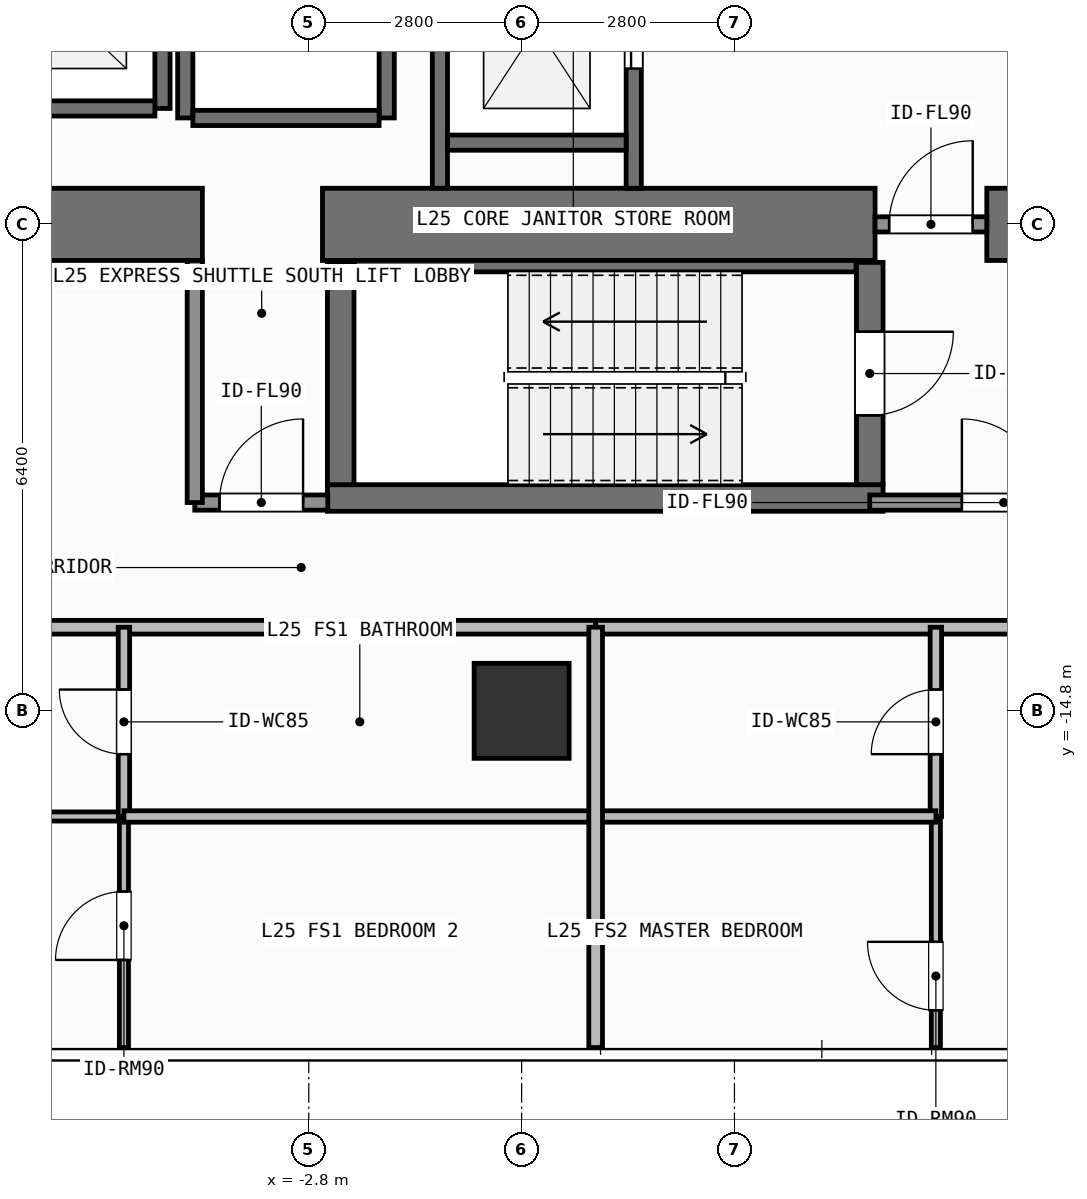
"""IFC4 building model, lengths in metres.
Left out: names, types, materials, properties, quantities, classifications, styles, units other than length and angle.
Written with IfcOpenShell. Run it as: python <this file> out.ifc"""

import sys

from ifc_helpers import new_model, si_unit, direction, frame, frame_2d, origin, origin_2d, place, context, subcontext, project, spatial, rectangle, extrude, element, fill, save


model = new_model("IFC4")
c1 = context("Model", 3, precision=1e-05, world=origin(), true_north=direction((0.0, 1.0)))
c2 = subcontext(c1, "Body", "Model", "MODEL_VIEW")
j1 = project(units=[si_unit("LENGTHUNIT", "METRE"), si_unit("PLANEANGLEUNIT", "RADIAN")], contexts=[c1])
p1 = place(None, origin())
s1 = spatial("IfcSite", under=j1, at=p1, CompositionType="ELEMENT")
p2 = place(p1, origin())
s2 = spatial("IfcBuilding", under=s1, at=p2, CompositionType="ELEMENT")
p3 = place(p2, frame((0.0, 0.0, 100.8)))
s3 = spatial("IfcBuildingStorey", under=s2, at=p3, CompositionType="ELEMENT", Elevation=100.8)
p4 = place(p3, frame((-7.55, -8.4, 0.0), z_axis=(0.0, 0.0, 1.0), x_axis=(1.0, 0.0, 0.0)))
e1 = element("IfcWall", 1, at=p4, inside=s3, PredefinedType="SHEAR", context=c2, shape_type="SweptSolid", body=[
    extrude(rectangle(XDim=3.35, YDim=0.95, at=frame_2d((1.675, 0.0))), origin(), (0.0, 0.0, 1.0), 3.9),
])
p5 = place(p3, frame((-2.62, -8.4, 0.0), z_axis=(0.0, 0.0, 1.0), x_axis=(1.0, 0.0, 0.0)))
e2 = element("IfcWall", 2, at=p5, inside=s3, PredefinedType="SHEAR", context=c2, shape_type="SweptSolid", body=[
    extrude(rectangle(XDim=7.27, YDim=0.95, at=frame_2d((3.635, 0.0))), origin(), (0.0, 0.0, 1.0), 3.9),
])
p6 = place(p3, frame((6.12, -8.4, 0.0), z_axis=(0.0, 0.0, 1.0), x_axis=(1.0, 0.0, 0.0)))
e3 = element("IfcWall", 3, at=p6, inside=s3, PredefinedType="SHEAR", context=c2, shape_type="SweptSolid", body=[
    extrude(rectangle(XDim=2.755, YDim=0.95, at=frame_2d((1.377, 0.0))), origin(), (0.0, 0.0, 1.0), 3.9),
])
p7 = place(p3, frame((-2.555, -12.0, 0.0), z_axis=(0.0, 0.0, 1.0), x_axis=(1.0, 0.0, 0.0)))
e4 = element("IfcWall", 4, at=p7, inside=s3, PredefinedType="SHEAR", context=c2, shape_type="SweptSolid", body=[
    extrude(rectangle(XDim=7.31, YDim=0.35, at=frame_2d((3.655, 0.0))), origin(), (0.0, 0.0, 1.0), 3.9),
])
p8 = place(p3, frame((-2.2, -8.95, 0.0), z_axis=(0.0, 0.0, 1.0), x_axis=(1.0, 0.0, 0.0)))
e5 = element("IfcWall", 5, at=p8, inside=s3, PredefinedType="SHEAR", context=c2, shape_type="SweptSolid", body=[
    extrude(rectangle(XDim=6.6, YDim=0.15, at=frame_2d((3.3, 0.0))), origin(), (0.0, 0.0, 1.0), 3.9),
])
p9 = place(p3, frame((-2.38, -11.825, 0.0), z_axis=(0.0, 0.0, 1.0), x_axis=(0.0, 1.0, 0.0)))
e6 = element("IfcWall", 6, at=p9, inside=s3, PredefinedType="SHEAR", context=c2, shape_type="SweptSolid", body=[
    extrude(rectangle(XDim=2.925, YDim=0.35, at=frame_2d((1.462, 0.0))), origin(), (0.0, 0.0, 1.0), 3.9),
])
p10 = place(p3, frame((4.58, -8.9, 0.0), z_axis=(0.0, 0.0, 1.0), x_axis=(0.0, -1.0, 0.0)))
e7 = element("IfcWall", 7, at=p10, inside=s3, PredefinedType="SHEAR", context=c2, shape_type="SweptSolid", body=[
    extrude(rectangle(XDim=2.925, YDim=0.35, at=frame_2d((1.462, 0.0))), origin(), (0.0, 0.0, 1.0), 3.9),
])
p11 = place(p10, frame((0.913, 0.0, 0.0)))
e8 = element("IfcOpeningElement", 8, at=p11, cuts=e7, PredefinedType="OPENING", context=c2, shape_type="SweptSolid", body=[
    extrude(rectangle(XDim=1.1, YDim=2.15, at=frame_2d((0.55, 1.075))), frame((0.0, 0.185, 0.0), z_axis=(0.0, -1.0, 0.0), x_axis=(1.0, 0.0, 0.0)), (0.0, 0.0, 1.0), 0.37),
])
p12 = place(p3, frame((0.0, -14.8, 0.0), z_axis=(0.0, 0.0, 1.0), x_axis=(1.0, 0.0, 0.0)))
e9 = element("IfcColumn", 9, at=p12, inside=s3, PredefinedType="COLUMN", context=c2, shape_type="SweptSolid", body=[
    extrude(rectangle(XDim=1.25, YDim=1.25, at=origin_2d()), origin(), (0.0, 0.0, 1.0), 3.9),
])
p13 = place(p3, frame((-4.725, -6.875, 0.0), z_axis=(0.0, 0.0, 1.0), x_axis=(0.0, 1.0, 0.0)))
e10 = element("IfcWall", 10, at=p13, inside=s3, PredefinedType="SHEAR", context=c2, shape_type="SweptSolid", body=[
    extrude(rectangle(XDim=2.55, YDim=0.2, at=frame_2d((1.275, 0.0))), origin(), (0.0, 0.0, 1.0), 3.68),
])
p14 = place(p3, frame((-7.175, -6.875, 0.0), z_axis=(0.0, 0.0, 1.0), x_axis=(1.0, 0.0, 0.0)))
e11 = element("IfcWall", 11, at=p14, inside=s3, PredefinedType="SHEAR", context=c2, shape_type="SweptSolid", body=[
    extrude(rectangle(XDim=2.35, YDim=0.2, at=frame_2d((1.175, 0.0))), origin(), (0.0, 0.0, 1.0), 3.68),
])
for number, where, z_axis, x_axis in (
    (12, (-4.425, -7.0, 0.0), (0.0, 0.0, 1.0), (0.0, 1.0, 0.0)),
    (13, (-1.775, -7.0, 0.0), (0.0, 0.0, 1.0), (0.0, 1.0, 0.0)),
):
    element("IfcWall", number, at=place(p3, frame(where, z_axis=z_axis, x_axis=x_axis)), inside=s3, PredefinedType="SHEAR", context=c2, shape_type="SweptSolid", body=[
        extrude(rectangle(XDim=2.8, YDim=0.2, at=frame_2d((1.4, 0.0))), origin(), (0.0, 0.0, 1.0), 3.68),
    ])
p15 = place(p3, frame((-4.325, -7.0, 0.0), z_axis=(0.0, 0.0, 1.0), x_axis=(1.0, 0.0, 0.0)))
e14 = element("IfcWall", 14, at=p15, inside=s3, PredefinedType="SHEAR", context=c2, shape_type="SweptSolid", body=[
    extrude(rectangle(XDim=2.45, YDim=0.2, at=frame_2d((1.225, 0.0))), origin(), (0.0, 0.0, 1.0), 3.68),
])
p16 = place(p3, frame((-1.075, -7.925, 0.0), z_axis=(0.0, 0.0, 1.0), x_axis=(0.0, 1.0, 0.0)))
e15 = element("IfcWall", 15, at=p16, inside=s3, PredefinedType="SHEAR", context=c2, shape_type="SweptSolid", body=[
    extrude(rectangle(XDim=3.65, YDim=0.2, at=frame_2d((1.825, 0.0))), origin(), (0.0, 0.0, 1.0), 3.68),
])
p17 = place(p3, frame((1.475, -7.925, 0.0), z_axis=(0.0, 0.0, 1.0), x_axis=(0.0, 1.0, 0.0)))
e16 = element("IfcWall", 16, at=p17, inside=s3, PredefinedType="SHEAR", context=c2, shape_type="SweptSolid", body=[
    extrude(rectangle(XDim=3.65, YDim=0.2, at=frame_2d((1.825, 0.0))), origin(), (0.0, 0.0, 1.0), 3.68),
])
p18 = place(p17, frame((1.575, 0.0, 0.0)))
e17 = element("IfcOpeningElement", 17, at=p18, cuts=e16, PredefinedType="OPENING", context=c2, shape_type="SweptSolid", body=[
    extrude(rectangle(XDim=1.1, YDim=2.2, at=frame_2d((0.55, 1.1))), frame((0.0, 0.11, 0.0), z_axis=(0.0, -1.0, 0.0), x_axis=(1.0, 0.0, 0.0)), (0.0, 0.0, 1.0), 0.22),
])
p19 = place(p3, frame((-0.975, -7.325, 0.0), z_axis=(0.0, 0.0, 1.0), x_axis=(1.0, 0.0, 0.0)))
e18 = element("IfcWall", 18, at=p19, inside=s3, PredefinedType="SHEAR", context=c2, shape_type="SweptSolid", body=[
    extrude(rectangle(XDim=2.35, YDim=0.2, at=frame_2d((1.175, 0.0))), origin(), (0.0, 0.0, 1.0), 3.68),
])
p20 = place(p3, frame((4.58, -12.06, 0.0), z_axis=(0.0, 0.0, 1.0), x_axis=(1.0, 0.0, 0.0)))
e19 = element("IfcWall", 19, at=p20, inside=s3, PredefinedType="SOLIDWALL", context=c2, shape_type="SweptSolid", body=[
    extrude(rectangle(XDim=3.7, YDim=0.2, at=frame_2d((1.85, 0.0))), origin(), (0.0, 0.0, 1.0), 3.68),
])
p21 = place(p20, frame((1.212, 0.0, 0.0)))
e20 = element("IfcOpeningElement", 20, at=p21, cuts=e19, PredefinedType="OPENING", context=c2, shape_type="SweptSolid", body=[
    extrude(rectangle(XDim=1.1, YDim=2.15, at=frame_2d((0.55, 1.075))), frame((0.0, 0.11, 0.0), z_axis=(0.0, -1.0, 0.0), x_axis=(1.0, 0.0, 0.0)), (0.0, 0.0, 1.0), 0.22),
])
p22 = place(p3, frame((4.65, -8.4, 0.0), z_axis=(0.0, 0.0, 1.0), x_axis=(1.0, 0.0, 0.0)))
e21 = element("IfcWall", 21, at=p22, inside=s3, PredefinedType="SOLIDWALL", context=c2, shape_type="SweptSolid", body=[
    extrude(rectangle(XDim=1.47, YDim=0.2, at=frame_2d((0.735, 0.0))), origin(), (0.0, 0.0, 1.0), 2.72),
])
p23 = place(p22, frame((0.185, 0.0, 0.0)))
e22 = element("IfcOpeningElement", 22, at=p23, cuts=e21, PredefinedType="OPENING", context=c2, shape_type="SweptSolid", body=[
    extrude(rectangle(XDim=1.1, YDim=2.15, at=frame_2d((0.55, 1.075))), frame((0.0, 0.11, 0.0), z_axis=(0.0, -1.0, 0.0), x_axis=(1.0, 0.0, 0.0)), (0.0, 0.0, 1.0), 0.22),
])
p24 = place(p3, frame((-4.3, -12.06, 0.0), z_axis=(0.0, 0.0, 1.0), x_axis=(1.0, 0.0, 0.0)))
e23 = element("IfcWall", 23, at=p24, inside=s3, PredefinedType="SOLIDWALL", context=c2, shape_type="SweptSolid", body=[
    extrude(rectangle(XDim=1.75, YDim=0.2, at=frame_2d((0.875, 0.0))), origin(), (0.0, 0.0, 1.0), 3.68),
])
p25 = place(p24, frame((0.325, 0.0, 0.0)))
e24 = element("IfcOpeningElement", 24, at=p25, cuts=e23, PredefinedType="OPENING", context=c2, shape_type="SweptSolid", body=[
    extrude(rectangle(XDim=1.1, YDim=2.15, at=frame_2d((0.55, 1.075))), frame((0.0, 0.11, 0.0), z_axis=(0.0, -1.0, 0.0), x_axis=(1.0, 0.0, 0.0)), (0.0, 0.0, 1.0), 0.22),
])
p26 = place(p3, frame((-24.42, -13.7, 0.0), z_axis=(0.0, 0.0, 1.0), x_axis=(1.0, 0.0, 0.0)))
e25 = element("IfcWall", 25, at=p26, inside=s3, PredefinedType="PARTITIONING", context=c2, shape_type="SweptSolid", body=[
    extrude(rectangle(XDim=25.394, YDim=0.18, at=frame_2d((12.697, 0.0))), origin(), (0.0, 0.0, 1.0), 3.68),
])
p27 = place(p26, frame((10.939, 0.0, 0.0)))
e26 = element("IfcOpeningElement", 26, at=p27, cuts=e25, PredefinedType="OPENING", context=c2, shape_type="SweptSolid", body=[
    extrude(rectangle(XDim=1.0, YDim=2.2, at=frame_2d((0.5, 1.1))), frame((0.0, 0.1, 0.0), z_axis=(0.0, -1.0, 0.0), x_axis=(1.0, 0.0, 0.0)), (0.0, 0.0, 1.0), 0.2),
])
p28 = place(p3, frame((-20.725, -16.19, 0.0), z_axis=(0.0, 0.0, 1.0), x_axis=(1.0, 0.0, 0.0)))
e27 = element("IfcWall", 27, at=p28, inside=s3, PredefinedType="PARTITIONING", context=c2, shape_type="SweptSolid", body=[
    extrude(rectangle(XDim=15.493, YDim=0.12, at=frame_2d((7.747, 0.0))), origin(), (0.0, 0.0, 1.0), 3.68),
])
p29 = place(p28, frame((7.296, 0.0, 0.0)))
e28 = element("IfcOpeningElement", 28, at=p29, cuts=e27, PredefinedType="OPENING", context=c2, shape_type="SweptSolid", body=[
    extrude(rectangle(XDim=0.9, YDim=2.1, at=frame_2d((0.45, 1.05))), frame((0.0, 0.07, 0.0), z_axis=(0.0, -1.0, 0.0), x_axis=(1.0, 0.0, 0.0)), (0.0, 0.0, 1.0), 0.14),
])
p30 = place(p3, frame((-5.232, -16.19, 0.0), z_axis=(0.0, 0.0, 1.0), x_axis=(0.0, 1.0, 0.0)))
e29 = element("IfcWall", 29, at=p30, inside=s3, PredefinedType="PARTITIONING", context=c2, shape_type="SweptSolid", body=[
    extrude(rectangle(XDim=2.49, YDim=0.15, at=frame_2d((1.245, 0.0))), origin(), (0.0, 0.0, 1.0), 3.68),
])
p31 = place(p30, frame((0.82, 0.0, 0.0)))
e30 = element("IfcOpeningElement", 30, at=p31, cuts=e29, PredefinedType="OPENING", context=c2, shape_type="SweptSolid", body=[
    extrude(rectangle(XDim=0.85, YDim=2.1, at=frame_2d((0.425, 1.05))), frame((0.0, 0.085, 0.0), z_axis=(0.0, -1.0, 0.0), x_axis=(1.0, 0.0, 0.0)), (0.0, 0.0, 1.0), 0.17),
])
p32 = place(p3, frame((-5.232, -19.23, 0.0), z_axis=(0.0, 0.0, 1.0), x_axis=(0.0, 1.0, 0.0)))
e31 = element("IfcWall", 31, at=p32, inside=s3, PredefinedType="PARTITIONING", context=c2, shape_type="SweptSolid", body=[
    extrude(rectangle(XDim=3.04, YDim=0.12, at=frame_2d((1.52, 0.0))), origin(), (0.0, 0.0, 1.0), 3.68),
])
p33 = place(p32, frame((1.153, 0.0, 0.0)))
e32 = element("IfcOpeningElement", 32, at=p33, cuts=e31, PredefinedType="OPENING", context=c2, shape_type="SweptSolid", body=[
    extrude(rectangle(XDim=0.9, YDim=2.1, at=frame_2d((0.45, 1.05))), frame((0.0, 0.07, 0.0), z_axis=(0.0, -1.0, 0.0), x_axis=(1.0, 0.0, 0.0)), (0.0, 0.0, 1.0), 0.14),
])
p34 = place(p3, frame((0.974, -13.7, 0.0), z_axis=(0.0, 0.0, 1.0), x_axis=(1.0, 0.0, 0.0)))
e33 = element("IfcWall", 33, at=p34, inside=s3, PredefinedType="PARTITIONING", context=c2, shape_type="SweptSolid", body=[
    extrude(rectangle(XDim=17.646, YDim=0.18, at=frame_2d((8.823, 0.0))), origin(), (0.0, 0.0, 1.0), 3.68),
])
p35 = place(p34, frame((7.695, 0.0, 0.0)))
e34 = element("IfcOpeningElement", 34, at=p35, cuts=e33, PredefinedType="OPENING", context=c2, shape_type="SweptSolid", body=[
    extrude(rectangle(XDim=1.0, YDim=2.2, at=frame_2d((0.5, 1.1))), frame((0.0, 0.1, 0.0), z_axis=(0.0, -1.0, 0.0), x_axis=(1.0, 0.0, 0.0)), (0.0, 0.0, 1.0), 0.2),
])
p36 = place(p3, frame((5.45, -16.19, 0.0), z_axis=(0.0, 0.0, 1.0), x_axis=(0.0, 1.0, 0.0)))
e35 = element("IfcWall", 35, at=p36, inside=s3, PredefinedType="PARTITIONING", context=c2, shape_type="SweptSolid", body=[
    extrude(rectangle(XDim=2.49, YDim=0.15, at=frame_2d((1.245, 0.0))), origin(), (0.0, 0.0, 1.0), 3.68),
])
p37 = place(p36, frame((0.82, 0.0, 0.0)))
e36 = element("IfcOpeningElement", 36, at=p37, cuts=e35, PredefinedType="OPENING", context=c2, shape_type="SweptSolid", body=[
    extrude(rectangle(XDim=0.85, YDim=2.1, at=frame_2d((0.425, 1.05))), frame((0.0, 0.085, 0.0), z_axis=(0.0, -1.0, 0.0), x_axis=(1.0, 0.0, 0.0)), (0.0, 0.0, 1.0), 0.17),
])
p38 = place(p3, frame((5.45, -19.23, 0.0), z_axis=(0.0, 0.0, 1.0), x_axis=(0.0, 1.0, 0.0)))
e37 = element("IfcWall", 37, at=p38, inside=s3, PredefinedType="PARTITIONING", context=c2, shape_type="SweptSolid", body=[
    extrude(rectangle(XDim=3.04, YDim=0.12, at=frame_2d((1.52, 0.0))), origin(), (0.0, 0.0, 1.0), 3.68),
])
p39 = place(p38, frame((0.491, 0.0, 0.0)))
e38 = element("IfcOpeningElement", 38, at=p39, cuts=e37, PredefinedType="OPENING", context=c2, shape_type="SweptSolid", body=[
    extrude(rectangle(XDim=0.9, YDim=2.1, at=frame_2d((0.45, 1.05))), frame((0.0, 0.07, 0.0), z_axis=(0.0, -1.0, 0.0), x_axis=(1.0, 0.0, 0.0)), (0.0, 0.0, 1.0), 0.14),
])
p40 = place(p3, frame((-4.3, -12.06, 0.0), z_axis=(0.0, 0.0, 1.0), x_axis=(0.0, 1.0, 0.0)))
e39 = element("IfcWall", 39, at=p40, inside=s3, PredefinedType="SOLIDWALL", context=c2, shape_type="SweptSolid", body=[
    extrude(rectangle(XDim=3.185, YDim=0.2, at=frame_2d((1.593, 0.0))), origin(), (0.0, 0.0, 1.0), 3.68),
])
p41 = place(p3, frame((-5.232, -16.19, 0.0), z_axis=(0.0, 0.0, 1.0), x_axis=(1.0, 0.0, 0.0)))
e40 = element("IfcWall", 40, at=p41, inside=s3, PredefinedType="PARTITIONING", context=c2, shape_type="SweptSolid", body=[
    extrude(rectangle(XDim=6.206, YDim=0.15, at=frame_2d((3.103, 0.0))), origin(), (0.0, 0.0, 1.0), 3.68),
])
p42 = place(p3, frame((0.974, -16.19, 0.0), z_axis=(0.0, 0.0, 1.0), x_axis=(1.0, 0.0, 0.0)))
e41 = element("IfcWall", 41, at=p42, inside=s3, PredefinedType="PARTITIONING", context=c2, shape_type="SweptSolid", body=[
    extrude(rectangle(XDim=4.476, YDim=0.15, at=frame_2d((2.238, 0.0))), origin(), (0.0, 0.0, 1.0), 3.68),
])
p43 = place(p3, frame((0.974, -19.23, 0.0), z_axis=(0.0, 0.0, 1.0), x_axis=(0.0, 1.0, 0.0)))
e42 = element("IfcWall", 42, at=p43, inside=s3, PredefinedType="PARTITIONING", context=c2, shape_type="SweptSolid", body=[
    extrude(rectangle(XDim=5.53, YDim=0.18, at=frame_2d((2.765, 0.0))), origin(), (0.0, 0.0, 1.0), 3.68),
])
p44 = place(p18, origin())
e43 = element("IfcDoor", 43, at=p44, inside=s3, OperationType="SLIDING_TO_LEFT", PredefinedType="DOOR", context=c2, shape_type="SweptSolid", body=[
    extrude(rectangle(XDim=1.1, YDim=2.2, at=frame_2d((0.55, 1.1))), frame((0.0, 0.025, 0.0), z_axis=(0.0, -1.0, 0.0), x_axis=(1.0, 0.0, 0.0)), (0.0, 0.0, 1.0), 0.05),
])
fill(e17, e43)
p45 = place(p11, origin())
e44 = element("IfcDoor", 44, at=p45, inside=s3, OperationType="SINGLE_SWING_LEFT", PredefinedType="DOOR", context=c2, shape_type="SweptSolid", body=[
    extrude(rectangle(XDim=1.1, YDim=2.15, at=frame_2d((0.55, 1.075))), frame((0.0, 0.025, 0.0), z_axis=(0.0, -1.0, 0.0), x_axis=(1.0, 0.0, 0.0)), (0.0, 0.0, 1.0), 0.05),
])
fill(e8, e44)
p46 = place(p21, origin())
e45 = element("IfcDoor", 45, at=p46, inside=s3, OperationType="SINGLE_SWING_LEFT", PredefinedType="DOOR", context=c2, shape_type="SweptSolid", body=[
    extrude(rectangle(XDim=1.1, YDim=2.15, at=frame_2d((0.55, 1.075))), frame((0.0, 0.025, 0.0), z_axis=(0.0, -1.0, 0.0), x_axis=(1.0, 0.0, 0.0)), (0.0, 0.0, 1.0), 0.05),
])
fill(e20, e45)
p47 = place(p23, origin())
e46 = element("IfcDoor", 46, at=p47, inside=s3, OperationType="SINGLE_SWING_RIGHT", PredefinedType="DOOR", context=c2, shape_type="SweptSolid", body=[
    extrude(rectangle(XDim=1.1, YDim=2.15, at=frame_2d((0.55, 1.075))), frame((0.0, 0.025, 0.0), z_axis=(0.0, -1.0, 0.0), x_axis=(1.0, 0.0, 0.0)), (0.0, 0.0, 1.0), 0.05),
])
fill(e22, e46)
p48 = place(p25, origin())
e47 = element("IfcDoor", 47, at=p48, inside=s3, OperationType="SINGLE_SWING_RIGHT", PredefinedType="DOOR", context=c2, shape_type="SweptSolid", body=[
    extrude(rectangle(XDim=1.1, YDim=2.15, at=frame_2d((0.55, 1.075))), frame((0.0, 0.025, 0.0), z_axis=(0.0, -1.0, 0.0), x_axis=(1.0, 0.0, 0.0)), (0.0, 0.0, 1.0), 0.05),
])
fill(e24, e47)
p49 = place(p31, origin())
e48 = element("IfcDoor", 48, at=p49, inside=s3, OperationType="SINGLE_SWING_RIGHT", PredefinedType="DOOR", context=c2, shape_type="SweptSolid", body=[
    extrude(rectangle(XDim=0.85, YDim=2.1, at=frame_2d((0.425, 1.05))), frame((0.0, 0.025, 0.0), z_axis=(0.0, -1.0, 0.0), x_axis=(1.0, 0.0, 0.0)), (0.0, 0.0, 1.0), 0.05),
])
fill(e30, e48)
p50 = place(p33, origin())
e49 = element("IfcDoor", 49, at=p50, inside=s3, OperationType="SINGLE_SWING_LEFT", PredefinedType="DOOR", context=c2, shape_type="SweptSolid", body=[
    extrude(rectangle(XDim=0.9, YDim=2.1, at=frame_2d((0.45, 1.05))), frame((0.0, 0.025, 0.0), z_axis=(0.0, -1.0, 0.0), x_axis=(1.0, 0.0, 0.0)), (0.0, 0.0, 1.0), 0.05),
])
fill(e32, e49)
p51 = place(p37, origin())
e50 = element("IfcDoor", 50, at=p51, inside=s3, OperationType="SINGLE_SWING_LEFT", PredefinedType="DOOR", context=c2, shape_type="SweptSolid", body=[
    extrude(rectangle(XDim=0.85, YDim=2.1, at=frame_2d((0.425, 1.05))), frame((0.0, 0.025, 0.0), z_axis=(0.0, -1.0, 0.0), x_axis=(1.0, 0.0, 0.0)), (0.0, 0.0, 1.0), 0.05),
])
fill(e36, e50)
p52 = place(p39, origin())
e51 = element("IfcDoor", 51, at=p52, inside=s3, OperationType="SINGLE_SWING_RIGHT", PredefinedType="DOOR", context=c2, shape_type="SweptSolid", body=[
    extrude(rectangle(XDim=0.9, YDim=2.1, at=frame_2d((0.45, 1.05))), frame((0.0, 0.025, 0.0), z_axis=(0.0, -1.0, 0.0), x_axis=(1.0, 0.0, 0.0)), (0.0, 0.0, 1.0), 0.05),
])
fill(e38, e51)
save(model, sys.argv[1])
